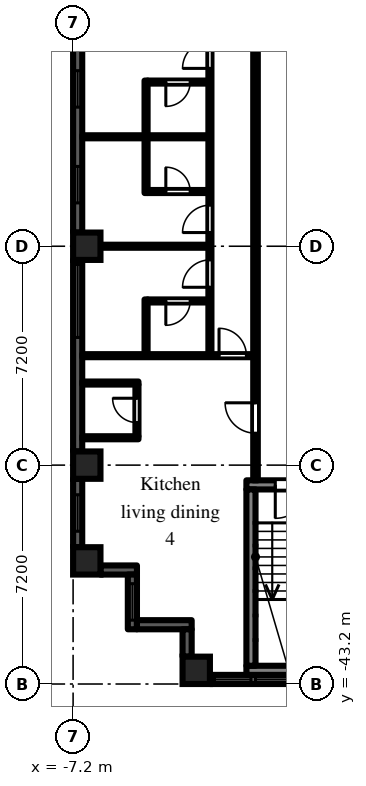
"""IFC4 building model, lengths in metres.
Left out: names, types, materials, properties, quantities, classifications, styles, units other than length and angle.
Written with IfcOpenShell. Run it as: python <this file> out.ifc"""

import sys

from ifc_helpers import new_model, si_unit, direction, frame, frame_2d, origin, origin_2d, place, context, subcontext, project, spatial, rectangle, extrude, element, fill, save


model = new_model("IFC4")
c1 = context("Model", 3, precision=1e-05, world=origin(), true_north=direction((0.0, 1.0)))
c2 = subcontext(c1, "Body", "Model", "MODEL_VIEW")
j1 = project(units=[si_unit("LENGTHUNIT", "METRE"), si_unit("PLANEANGLEUNIT", "RADIAN")], contexts=[c1])
p1 = place(None, origin())
s1 = spatial("IfcSite", under=j1, at=p1, CompositionType="ELEMENT")
p2 = place(p1, origin())
s2 = spatial("IfcBuilding", under=s1, at=p2, CompositionType="ELEMENT")
p3 = place(p2, frame((0.0, 0.0, 11.7)))
s3 = spatial("IfcBuildingStorey", under=s2, at=p3, CompositionType="ELEMENT", Elevation=11.7)
for number, where, z_axis, x_axis in (
    (1, (-6.75, -39.15, 0.0), (0.0, 0.0, 1.0), (1.0, 0.0, 0.0)),
    (2, (-6.75, -36.0, 0.0), (0.0, 0.0, 1.0), (1.0, 0.0, 0.0)),
    (3, (-6.75, -28.8, 0.0), (0.0, 0.0, 1.0), (1.0, 0.0, 0.0)),
    (4, (-3.15, -42.75, 0.0), (0.0, 0.0, 1.0), (1.0, 0.0, 0.0)),
):
    element("IfcColumn", number, at=place(p3, frame(where, z_axis=z_axis, x_axis=x_axis)), inside=s3, PredefinedType="COLUMN", context=c2, shape_type="SweptSolid", body=[
        extrude(rectangle(XDim=0.9, YDim=0.9, at=origin_2d()), origin(), (0.0, 0.0, 1.0), 3.0),
    ])
p4 = place(p3, frame((-7.05, -22.05, 0.0), z_axis=(0.0, 0.0, 1.0), x_axis=(0.0, -1.0, 0.0)))
e5 = element("IfcWall", 5, at=p4, inside=s3, PredefinedType="SOLIDWALL", context=c2, shape_type="SweptSolid", body=[
    extrude(rectangle(XDim=6.3, YDim=0.3, at=frame_2d((3.15, 0.0))), origin(), (0.0, 0.0, 1.0), 2.1),
])
p5 = place(p4, frame((0.975, 0.0, 0.2)))
e6 = element("IfcOpeningElement", 6, at=p5, cuts=e5, PredefinedType="OPENING", context=c2, shape_type="SweptSolid", body=[
    extrude(rectangle(XDim=1.2, YDim=1.85, at=frame_2d((0.6, 0.925))), frame((0.0, 0.16, 0.0), z_axis=(0.0, -1.0, 0.0), x_axis=(1.0, 0.0, 0.0)), (0.0, 0.0, 1.0), 0.32),
])
p6 = place(p4, frame((4.125, 0.0, 0.2)))
e7 = element("IfcOpeningElement", 7, at=p6, cuts=e5, PredefinedType="OPENING", context=c2, shape_type="SweptSolid", body=[
    extrude(rectangle(XDim=1.2, YDim=1.85, at=frame_2d((0.6, 0.925))), frame((0.0, 0.16, 0.0), z_axis=(0.0, -1.0, 0.0), x_axis=(1.0, 0.0, 0.0)), (0.0, 0.0, 1.0), 0.32),
])
p7 = place(p3, frame((-7.05, -29.25, 0.0), z_axis=(0.0, 0.0, 1.0), x_axis=(0.0, -1.0, 0.0)))
e8 = element("IfcWall", 8, at=p7, inside=s3, PredefinedType="SOLIDWALL", context=c2, shape_type="SweptSolid", body=[
    extrude(rectangle(XDim=6.3, YDim=0.3, at=frame_2d((3.15, 0.0))), origin(), (0.0, 0.0, 1.0), 2.1),
])
p8 = place(p7, frame((0.15, 0.0, 0.2)))
e9 = element("IfcOpeningElement", 9, at=p8, cuts=e8, PredefinedType="OPENING", context=c2, shape_type="SweptSolid", body=[
    extrude(rectangle(XDim=2.4, YDim=1.85, at=frame_2d((1.2, 0.925))), frame((0.0, 0.16, 0.0), z_axis=(0.0, -1.0, 0.0), x_axis=(1.0, 0.0, 0.0)), (0.0, 0.0, 1.0), 0.32),
])
p9 = place(p3, frame((-7.05, -36.45, 0.0), z_axis=(0.0, 0.0, 1.0), x_axis=(0.0, -1.0, 0.0)))
e10 = element("IfcWall", 10, at=p9, inside=s3, PredefinedType="SOLIDWALL", context=c2, shape_type="SweptSolid", body=[
    extrude(rectangle(XDim=2.25, YDim=0.3, at=frame_2d((1.125, 0.0))), origin(), (0.0, 0.0, 1.0), 2.1),
])
p10 = place(p9, frame((0.525, 0.0, 0.2)))
e11 = element("IfcOpeningElement", 11, at=p10, cuts=e10, PredefinedType="OPENING", context=c2, shape_type="SweptSolid", body=[
    extrude(rectangle(XDim=1.2, YDim=1.85, at=frame_2d((0.6, 0.925))), frame((0.0, 0.16, 0.0), z_axis=(0.0, -1.0, 0.0), x_axis=(1.0, 0.0, 0.0)), (0.0, 0.0, 1.0), 0.32),
])
p11 = place(p3, frame((-6.3, -39.45, 0.0), z_axis=(0.0, 0.0, 1.0), x_axis=(1.0, 0.0, 0.0)))
e12 = element("IfcWall", 12, at=p11, inside=s3, PredefinedType="SOLIDWALL", context=c2, shape_type="SweptSolid", body=[
    extrude(rectangle(XDim=1.2, YDim=0.3, at=frame_2d((0.6, 0.0))), origin(), (0.0, 0.0, 1.0), 2.575),
])
p12 = place(p3, frame((-5.25, -39.6, 0.0), z_axis=(0.0, 0.0, 1.0), x_axis=(0.0, -1.0, 0.0)))
e13 = element("IfcWall", 13, at=p12, inside=s3, PredefinedType="SOLIDWALL", context=c2, shape_type="SweptSolid", body=[
    extrude(rectangle(XDim=1.8, YDim=0.3, at=frame_2d((0.9, 0.0))), origin(), (0.0, 0.0, 1.0), 2.575),
])
p13 = place(p12, frame((0.3, 0.0, 0.2)))
e14 = element("IfcOpeningElement", 14, at=p13, cuts=e13, PredefinedType="OPENING", context=c2, shape_type="SweptSolid", body=[
    extrude(rectangle(XDim=1.2, YDim=1.85, at=frame_2d((0.6, 0.925))), frame((0.0, 0.16, 0.0), z_axis=(0.0, -1.0, 0.0), x_axis=(1.0, 0.0, 0.0)), (0.0, 0.0, 1.0), 0.32),
])
p14 = place(p3, frame((-5.1, -41.25, 0.0), z_axis=(0.0, 0.0, 1.0), x_axis=(1.0, 0.0, 0.0)))
e15 = element("IfcWall", 15, at=p14, inside=s3, PredefinedType="SOLIDWALL", context=c2, shape_type="SweptSolid", body=[
    extrude(rectangle(XDim=1.8, YDim=0.3, at=frame_2d((0.9, 0.0))), origin(), (0.0, 0.0, 1.0), 2.575),
])
p15 = place(p3, frame((-3.45, -41.4, 0.0), z_axis=(0.0, 0.0, 1.0), x_axis=(0.0, -1.0, 0.0)))
e16 = element("IfcWall", 16, at=p15, inside=s3, PredefinedType="SOLIDWALL", context=c2, shape_type="SweptSolid", body=[
    extrude(rectangle(XDim=0.9, YDim=0.3, at=frame_2d((0.45, 0.0))), origin(), (0.0, 0.0, 1.0), 2.575),
])
p16 = place(p3, frame((-2.7, -43.05, 0.0), z_axis=(0.0, 0.0, 1.0), x_axis=(1.0, 0.0, 0.0)))
e17 = element("IfcWall", 17, at=p16, inside=s3, PredefinedType="SOLIDWALL", context=c2, shape_type="SweptSolid", body=[
    extrude(rectangle(XDim=5.4, YDim=0.3, at=frame_2d((2.7, 0.0))), origin(), (0.0, 0.0, 1.0), 2.1),
])
p17 = place(p16, frame((1.5, 0.0, 0.2)))
e18 = element("IfcOpeningElement", 18, at=p17, cuts=e17, PredefinedType="OPENING", context=c2, shape_type="SweptSolid", body=[
    extrude(rectangle(XDim=2.4, YDim=1.85, at=frame_2d((1.2, 0.925))), frame((0.0, 0.16, 0.0), z_axis=(0.0, -1.0, 0.0), x_axis=(1.0, 0.0, 0.0)), (0.0, 0.0, 1.0), 0.32),
])
p18 = place(p16, frame((0.15, 0.0, 0.2)))
e19 = element("IfcOpeningElement", 19, at=p18, cuts=e17, PredefinedType="OPENING", context=c2, shape_type="SweptSolid", body=[
    extrude(rectangle(XDim=1.2, YDim=1.85, at=frame_2d((0.6, 0.925))), frame((0.0, 0.16, 0.0), z_axis=(0.0, -1.0, 0.0), x_axis=(1.0, 0.0, 0.0)), (0.0, 0.0, 1.0), 0.32),
])
p19 = place(p16, frame((4.05, 0.0, 0.2)))
e20 = element("IfcOpeningElement", 20, at=p19, cuts=e17, PredefinedType="OPENING", context=c2, shape_type="SweptSolid", body=[
    extrude(rectangle(XDim=1.2, YDim=1.85, at=frame_2d((0.6, 0.925))), frame((0.0, 0.16, 0.0), z_axis=(0.0, -1.0, 0.0), x_axis=(1.0, 0.0, 0.0)), (0.0, 0.0, 1.0), 0.32),
])
p20 = place(p3, frame((-1.5, -36.65, 0.0), z_axis=(0.0, 0.0, 1.0), x_axis=(1.0, 0.0, 0.0)))
e21 = element("IfcWall", 21, at=p20, inside=s3, PredefinedType="SHEAR", context=c2, shape_type="SweptSolid", body=[
    extrude(rectangle(XDim=3.0, YDim=0.3, at=frame_2d((1.5, 0.0))), origin(), (0.0, 0.0, 1.0), 2.575),
])
p21 = place(p20, frame((0.95, 0.0, 0.0)))
e22 = element("IfcOpeningElement", 22, at=p21, cuts=e21, PredefinedType="OPENING", context=c2, shape_type="SweptSolid", body=[
    extrude(rectangle(XDim=1.1, YDim=2.1, at=frame_2d((0.55, 1.05))), frame((0.0, 0.16, 0.0), z_axis=(0.0, -1.0, 0.0), x_axis=(1.0, 0.0, 0.0)), (0.0, 0.0, 1.0), 0.32),
])
p22 = place(p3, frame((-1.5, -42.75, 0.0), z_axis=(0.0, 0.0, 1.0), x_axis=(1.0, 0.0, 0.0)))
e23 = element("IfcWall", 23, at=p22, inside=s3, PredefinedType="SHEAR", context=c2, shape_type="SweptSolid", body=[
    extrude(rectangle(XDim=3.0, YDim=0.3, at=frame_2d((1.5, 0.0))), origin(), (0.0, 0.0, 1.0), 2.575),
])
p23 = place(p3, frame((-1.35, -36.8, 0.0), z_axis=(0.0, 0.0, 1.0), x_axis=(0.0, -1.0, 0.0)))
e24 = element("IfcWall", 24, at=p23, inside=s3, PredefinedType="SHEAR", context=c2, shape_type="SweptSolid", body=[
    extrude(rectangle(XDim=5.8, YDim=0.3, at=frame_2d((2.9, 0.0))), origin(), (0.0, 0.0, 1.0), 2.575),
])
for number, where, z_axis, x_axis in (
    (25, (-6.9, -35.1, 0.0), (0.0, 0.0, 1.0), (1.0, 0.0, 0.0)),
    (26, (-6.9, -33.3, 0.0), (0.0, 0.0, 1.0), (1.0, 0.0, 0.0)),
):
    element("IfcWall", number, at=place(p3, frame(where, z_axis=z_axis, x_axis=x_axis)), inside=s3, PredefinedType="PARTITIONING", context=c2, shape_type="SweptSolid", body=[
        extrude(rectangle(XDim=1.85, YDim=0.1, at=frame_2d((0.925, 0.0))), origin(), (0.0, 0.0, 1.0), 2.575),
    ])
p24 = place(p3, frame((-6.9, -32.4, 0.0), z_axis=(0.0, 0.0, 1.0), x_axis=(1.0, 0.0, 0.0)))
e27 = element("IfcWall", 27, at=p24, inside=s3, PredefinedType="PARTITIONING", context=c2, shape_type="SweptSolid", body=[
    extrude(rectangle(XDim=5.625, YDim=0.1, at=frame_2d((2.812, 0.0))), origin(), (0.0, 0.0, 1.0), 2.575),
])
p25 = place(p24, frame((4.5, 0.0, 0.0)))
e28 = element("IfcOpeningElement", 28, at=p25, cuts=e27, PredefinedType="OPENING", context=c2, shape_type="SweptSolid", body=[
    extrude(rectangle(XDim=0.9, YDim=2.1, at=frame_2d((0.45, 1.05))), frame((0.0, 0.06, 0.0), z_axis=(0.0, -1.0, 0.0), x_axis=(1.0, 0.0, 0.0)), (0.0, 0.0, 1.0), 0.12),
])
for number, where, z_axis, x_axis in (
    (29, (-6.9, -28.8, 0.0), (0.0, 0.0, 1.0), (1.0, 0.0, 0.0)),
    (30, (-6.9, -25.2, 0.0), (0.0, 0.0, 1.0), (1.0, 0.0, 0.0)),
):
    element("IfcWall", number, at=place(p3, frame(where, z_axis=z_axis, x_axis=x_axis)), inside=s3, PredefinedType="PARTITIONING", context=c2, shape_type="SweptSolid", body=[
        extrude(rectangle(XDim=4.15, YDim=0.1, at=frame_2d((2.075, 0.0))), origin(), (0.0, 0.0, 1.0), 2.575),
    ])
p26 = place(p3, frame((-5.1, -35.05, 0.0), z_axis=(0.0, 0.0, 1.0), x_axis=(0.0, 1.0, 0.0)))
e31 = element("IfcWall", 31, at=p26, inside=s3, PredefinedType="PARTITIONING", context=c2, shape_type="SweptSolid", body=[
    extrude(rectangle(XDim=1.7, YDim=0.1, at=frame_2d((0.85, 0.0))), origin(), (0.0, 0.0, 1.0), 2.575),
])
p27 = place(p26, frame((0.45, 0.0, 0.0)))
e32 = element("IfcOpeningElement", 32, at=p27, cuts=e31, PredefinedType="OPENING", context=c2, shape_type="SweptSolid", body=[
    extrude(rectangle(XDim=0.8, YDim=2.1, at=frame_2d((0.4, 1.05))), frame((0.0, 0.06, 0.0), z_axis=(0.0, -1.0, 0.0), x_axis=(1.0, 0.0, 0.0)), (0.0, 0.0, 1.0), 0.12),
])
p28 = place(p3, frame((-4.8, -32.35, 0.0), z_axis=(0.0, 0.0, 1.0), x_axis=(0.0, 1.0, 0.0)))
e33 = element("IfcWall", 33, at=p28, inside=s3, PredefinedType="PARTITIONING", context=c2, shape_type="SweptSolid", body=[
    extrude(rectangle(XDim=1.8, YDim=0.1, at=frame_2d((0.9, 0.0))), origin(), (0.0, 0.0, 1.0), 2.575),
])
p29 = place(p3, frame((-4.75, -30.6, 0.0), z_axis=(0.0, 0.0, 1.0), x_axis=(1.0, 0.0, 0.0)))
e34 = element("IfcWall", 34, at=p29, inside=s3, PredefinedType="PARTITIONING", context=c2, shape_type="SweptSolid", body=[
    extrude(rectangle(XDim=2.0, YDim=0.1, at=frame_2d((1.0, 0.0))), origin(), (0.0, 0.0, 1.0), 2.575),
])
p30 = place(p29, frame((0.6, 0.0, 0.0)))
e35 = element("IfcOpeningElement", 35, at=p30, cuts=e34, PredefinedType="OPENING", context=c2, shape_type="SweptSolid", body=[
    extrude(rectangle(XDim=0.8, YDim=2.1, at=frame_2d((0.4, 1.05))), frame((0.0, 0.06, 0.0), z_axis=(0.0, -1.0, 0.0), x_axis=(1.0, 0.0, 0.0)), (0.0, 0.0, 1.0), 0.12),
])
p31 = place(p3, frame((-4.8, -27.05, 0.0), z_axis=(0.0, 0.0, 1.0), x_axis=(0.0, 1.0, 0.0)))
e36 = element("IfcWall", 36, at=p31, inside=s3, PredefinedType="PARTITIONING", context=c2, shape_type="SweptSolid", body=[
    extrude(rectangle(XDim=3.7, YDim=0.1, at=frame_2d((1.85, 0.0))), origin(), (0.0, 0.0, 1.0), 2.575),
])
p32 = place(p3, frame((-4.75, -27.0, 0.0), z_axis=(0.0, 0.0, 1.0), x_axis=(1.0, 0.0, 0.0)))
e37 = element("IfcWall", 37, at=p32, inside=s3, PredefinedType="PARTITIONING", context=c2, shape_type="SweptSolid", body=[
    extrude(rectangle(XDim=2.0, YDim=0.1, at=frame_2d((1.0, 0.0))), origin(), (0.0, 0.0, 1.0), 2.575),
])
p33 = place(p32, frame((0.6, 0.0, 0.0)))
e38 = element("IfcOpeningElement", 38, at=p33, cuts=e37, PredefinedType="OPENING", context=c2, shape_type="SweptSolid", body=[
    extrude(rectangle(XDim=0.8, YDim=2.1, at=frame_2d((0.4, 1.05))), frame((0.0, 0.06, 0.0), z_axis=(0.0, -1.0, 0.0), x_axis=(1.0, 0.0, 0.0)), (0.0, 0.0, 1.0), 0.12),
])
p34 = place(p3, frame((-4.75, -23.4, 0.0), z_axis=(0.0, 0.0, 1.0), x_axis=(1.0, 0.0, 0.0)))
e39 = element("IfcWall", 39, at=p34, inside=s3, PredefinedType="PARTITIONING", context=c2, shape_type="SweptSolid", body=[
    extrude(rectangle(XDim=2.0, YDim=0.1, at=frame_2d((1.0, 0.0))), origin(), (0.0, 0.0, 1.0), 2.575),
])
p35 = place(p34, frame((0.6, 0.0, 0.0)))
e40 = element("IfcOpeningElement", 40, at=p35, cuts=e39, PredefinedType="OPENING", context=c2, shape_type="SweptSolid", body=[
    extrude(rectangle(XDim=0.8, YDim=2.1, at=frame_2d((0.4, 1.05))), frame((0.0, 0.06, 0.0), z_axis=(0.0, -1.0, 0.0), x_axis=(1.0, 0.0, 0.0)), (0.0, 0.0, 1.0), 0.12),
])
p36 = place(p3, frame((-2.7, -32.35, 0.0), z_axis=(0.0, 0.0, 1.0), x_axis=(0.0, 1.0, 0.0)))
e41 = element("IfcWall", 41, at=p36, inside=s3, PredefinedType="PARTITIONING", context=c2, shape_type="SweptSolid", body=[
    extrude(rectangle(XDim=17.888, YDim=0.1, at=frame_2d((8.944, 0.0))), origin(), (0.0, 0.0, 1.0), 2.575),
])
p37 = place(p36, frame((2.2, 0.0, 0.0)))
e42 = element("IfcOpeningElement", 42, at=p37, cuts=e41, PredefinedType="OPENING", context=c2, shape_type="SweptSolid", body=[
    extrude(rectangle(XDim=0.9, YDim=2.1, at=frame_2d((0.45, 1.05))), frame((0.0, 0.06, 0.0), z_axis=(0.0, -1.0, 0.0), x_axis=(1.0, 0.0, 0.0)), (0.0, 0.0, 1.0), 0.12),
])
p38 = place(p36, frame((4.0, 0.0, 0.0)))
e43 = element("IfcOpeningElement", 43, at=p38, cuts=e41, PredefinedType="OPENING", context=c2, shape_type="SweptSolid", body=[
    extrude(rectangle(XDim=0.9, YDim=2.1, at=frame_2d((0.45, 1.05))), frame((0.0, 0.06, 0.0), z_axis=(0.0, -1.0, 0.0), x_axis=(1.0, 0.0, 0.0)), (0.0, 0.0, 1.0), 0.12),
])
p39 = place(p36, frame((9.4, 0.0, 0.0)))
e44 = element("IfcOpeningElement", 44, at=p39, cuts=e41, PredefinedType="OPENING", context=c2, shape_type="SweptSolid", body=[
    extrude(rectangle(XDim=0.9, YDim=2.1, at=frame_2d((0.45, 1.05))), frame((0.0, 0.06, 0.0), z_axis=(0.0, -1.0, 0.0), x_axis=(1.0, 0.0, 0.0)), (0.0, 0.0, 1.0), 0.12),
])
p40 = place(p36, frame((11.2, 0.0, 0.0)))
e45 = element("IfcOpeningElement", 45, at=p40, cuts=e41, PredefinedType="OPENING", context=c2, shape_type="SweptSolid", body=[
    extrude(rectangle(XDim=0.9, YDim=2.1, at=frame_2d((0.45, 1.05))), frame((0.0, 0.06, 0.0), z_axis=(0.0, -1.0, 0.0), x_axis=(1.0, 0.0, 0.0)), (0.0, 0.0, 1.0), 0.12),
])
p41 = place(p36, frame((14.8, 0.0, 0.0)))
e46 = element("IfcOpeningElement", 46, at=p41, cuts=e41, PredefinedType="OPENING", context=c2, shape_type="SweptSolid", body=[
    extrude(rectangle(XDim=0.9, YDim=2.1, at=frame_2d((0.45, 1.05))), frame((0.0, 0.06, 0.0), z_axis=(0.0, -1.0, 0.0), x_axis=(1.0, 0.0, 0.0)), (0.0, 0.0, 1.0), 0.12),
])
p42 = place(p3, frame((-1.2, -36.5, 0.0), z_axis=(0.0, 0.0, 1.0), x_axis=(0.0, 1.0, 0.0)))
e47 = element("IfcWall", 47, at=p42, inside=s3, PredefinedType="PARTITIONING", context=c2, shape_type="SweptSolid", body=[
    extrude(rectangle(XDim=35.375, YDim=0.15, at=frame_2d((17.688, 0.0))), origin(), (0.0, 0.0, 1.0), 2.575),
])
p43 = place(p42, frame((31.85, 0.0, 0.0)))
e48 = element("IfcOpeningElement", 48, at=p43, cuts=e47, PredefinedType="OPENING", context=c2, shape_type="SweptSolid", body=[
    extrude(rectangle(XDim=0.9, YDim=2.1, at=frame_2d((0.45, 1.05))), frame((0.0, 0.085, 0.0), z_axis=(0.0, -1.0, 0.0), x_axis=(1.0, 0.0, 0.0)), (0.0, 0.0, 1.0), 0.17),
])
p44 = place(p42, frame((27.05, 0.0, 0.0)))
e49 = element("IfcOpeningElement", 49, at=p44, cuts=e47, PredefinedType="OPENING", context=c2, shape_type="SweptSolid", body=[
    extrude(rectangle(XDim=0.9, YDim=2.1, at=frame_2d((0.45, 1.05))), frame((0.0, 0.085, 0.0), z_axis=(0.0, -1.0, 0.0), x_axis=(1.0, 0.0, 0.0)), (0.0, 0.0, 1.0), 0.17),
])
p45 = place(p42, frame((1.55, 0.0, 0.0)))
e50 = element("IfcOpeningElement", 50, at=p45, cuts=e47, PredefinedType="OPENING", context=c2, shape_type="SweptSolid", body=[
    extrude(rectangle(XDim=1.0, YDim=2.1, at=frame_2d((0.5, 1.05))), frame((0.0, 0.085, 0.0), z_axis=(0.0, -1.0, 0.0), x_axis=(1.0, 0.0, 0.0)), (0.0, 0.0, 1.0), 0.17),
])
p46 = place(p5, origin())
e51 = element("IfcWindow", 51, at=p46, inside=s3, PartitioningType="SINGLE_PANEL", PredefinedType="WINDOW", context=c2, shape_type="SweptSolid", body=[
    extrude(rectangle(XDim=1.2, YDim=1.85, at=frame_2d((0.6, 0.925))), frame((0.0, 0.03, 0.0), z_axis=(0.0, -1.0, 0.0), x_axis=(1.0, 0.0, 0.0)), (0.0, 0.0, 1.0), 0.06),
])
fill(e6, e51)
p47 = place(p6, origin())
e52 = element("IfcWindow", 52, at=p47, inside=s3, PartitioningType="SINGLE_PANEL", PredefinedType="WINDOW", context=c2, shape_type="SweptSolid", body=[
    extrude(rectangle(XDim=1.2, YDim=1.85, at=frame_2d((0.6, 0.925))), frame((0.0, 0.03, 0.0), z_axis=(0.0, -1.0, 0.0), x_axis=(1.0, 0.0, 0.0)), (0.0, 0.0, 1.0), 0.06),
])
fill(e7, e52)
p48 = place(p8, origin())
e53 = element("IfcWindow", 53, at=p48, inside=s3, PartitioningType="SINGLE_PANEL", PredefinedType="WINDOW", context=c2, shape_type="SweptSolid", body=[
    extrude(rectangle(XDim=2.4, YDim=1.85, at=frame_2d((1.2, 0.925))), frame((0.0, 0.03, 0.0), z_axis=(0.0, -1.0, 0.0), x_axis=(1.0, 0.0, 0.0)), (0.0, 0.0, 1.0), 0.06),
])
fill(e9, e53)
p49 = place(p10, origin())
e54 = element("IfcWindow", 54, at=p49, inside=s3, PartitioningType="SINGLE_PANEL", PredefinedType="WINDOW", context=c2, shape_type="SweptSolid", body=[
    extrude(rectangle(XDim=1.2, YDim=1.85, at=frame_2d((0.6, 0.925))), frame((0.0, 0.03, 0.0), z_axis=(0.0, -1.0, 0.0), x_axis=(1.0, 0.0, 0.0)), (0.0, 0.0, 1.0), 0.06),
])
fill(e11, e54)
p50 = place(p13, origin())
e55 = element("IfcWindow", 55, at=p50, inside=s3, PartitioningType="SINGLE_PANEL", PredefinedType="WINDOW", context=c2, shape_type="SweptSolid", body=[
    extrude(rectangle(XDim=1.2, YDim=1.85, at=frame_2d((0.6, 0.925))), frame((0.0, 0.03, 0.0), z_axis=(0.0, -1.0, 0.0), x_axis=(1.0, 0.0, 0.0)), (0.0, 0.0, 1.0), 0.06),
])
fill(e14, e55)
p51 = place(p17, origin())
e56 = element("IfcWindow", 56, at=p51, inside=s3, PartitioningType="SINGLE_PANEL", PredefinedType="WINDOW", context=c2, shape_type="SweptSolid", body=[
    extrude(rectangle(XDim=2.4, YDim=1.85, at=frame_2d((1.2, 0.925))), frame((0.0, 0.03, 0.0), z_axis=(0.0, -1.0, 0.0), x_axis=(1.0, 0.0, 0.0)), (0.0, 0.0, 1.0), 0.06),
])
fill(e18, e56)
p52 = place(p18, origin())
e57 = element("IfcWindow", 57, at=p52, inside=s3, PartitioningType="SINGLE_PANEL", PredefinedType="WINDOW", context=c2, shape_type="SweptSolid", body=[
    extrude(rectangle(XDim=1.2, YDim=1.85, at=frame_2d((0.6, 0.925))), frame((0.0, 0.03, 0.0), z_axis=(0.0, -1.0, 0.0), x_axis=(1.0, 0.0, 0.0)), (0.0, 0.0, 1.0), 0.06),
])
fill(e19, e57)
p53 = place(p21, frame((1.1, 0.0, 0.0), z_axis=(0.0, 0.0, 1.0), x_axis=(-1.0, 0.0, 0.0)))
e58 = element("IfcDoor", 58, at=p53, inside=s3, OperationType="SINGLE_SWING_RIGHT", PredefinedType="DOOR", context=c2, shape_type="SweptSolid", body=[
    extrude(rectangle(XDim=1.1, YDim=2.1, at=frame_2d((0.55, 1.05))), frame((0.0, 0.025, 0.0), z_axis=(0.0, -1.0, 0.0), x_axis=(1.0, 0.0, 0.0)), (0.0, 0.0, 1.0), 0.05),
])
fill(e22, e58)
p54 = place(p27, origin())
e59 = element("IfcDoor", 59, at=p54, inside=s3, OperationType="SINGLE_SWING_RIGHT", PredefinedType="DOOR", context=c2, shape_type="SweptSolid", body=[
    extrude(rectangle(XDim=0.8, YDim=2.1, at=frame_2d((0.4, 1.05))), frame((0.0, 0.025, 0.0), z_axis=(0.0, -1.0, 0.0), x_axis=(1.0, 0.0, 0.0)), (0.0, 0.0, 1.0), 0.05),
])
fill(e32, e59)
p55 = place(p45, origin())
e60 = element("IfcDoor", 60, at=p55, inside=s3, OperationType="SINGLE_SWING_RIGHT", PredefinedType="DOOR", context=c2, shape_type="SweptSolid", body=[
    extrude(rectangle(XDim=1.0, YDim=2.1, at=frame_2d((0.5, 1.05))), frame((0.0, 0.025, 0.0), z_axis=(0.0, -1.0, 0.0), x_axis=(1.0, 0.0, 0.0)), (0.0, 0.0, 1.0), 0.05),
])
fill(e50, e60)
p56 = place(p37, origin())
e61 = element("IfcDoor", 61, at=p56, inside=s3, OperationType="SINGLE_SWING_LEFT", PredefinedType="DOOR", context=c2, shape_type="SweptSolid", body=[
    extrude(rectangle(XDim=0.9, YDim=2.1, at=frame_2d((0.45, 1.05))), frame((0.0, 0.025, 0.0), z_axis=(0.0, -1.0, 0.0), x_axis=(1.0, 0.0, 0.0)), (0.0, 0.0, 1.0), 0.05),
])
fill(e42, e61)
p57 = place(p38, origin())
e62 = element("IfcDoor", 62, at=p57, inside=s3, OperationType="SINGLE_SWING_LEFT", PredefinedType="DOOR", context=c2, shape_type="SweptSolid", body=[
    extrude(rectangle(XDim=0.9, YDim=2.1, at=frame_2d((0.45, 1.05))), frame((0.0, 0.025, 0.0), z_axis=(0.0, -1.0, 0.0), x_axis=(1.0, 0.0, 0.0)), (0.0, 0.0, 1.0), 0.05),
])
fill(e43, e62)
p58 = place(p39, origin())
e63 = element("IfcDoor", 63, at=p58, inside=s3, OperationType="SINGLE_SWING_LEFT", PredefinedType="DOOR", context=c2, shape_type="SweptSolid", body=[
    extrude(rectangle(XDim=0.9, YDim=2.1, at=frame_2d((0.45, 1.05))), frame((0.0, 0.025, 0.0), z_axis=(0.0, -1.0, 0.0), x_axis=(1.0, 0.0, 0.0)), (0.0, 0.0, 1.0), 0.05),
])
fill(e44, e63)
p59 = place(p25, origin())
e64 = element("IfcDoor", 64, at=p59, inside=s3, OperationType="SINGLE_SWING_LEFT", PredefinedType="DOOR", context=c2, shape_type="SweptSolid", body=[
    extrude(rectangle(XDim=0.9, YDim=2.1, at=frame_2d((0.45, 1.05))), frame((0.0, 0.025, 0.0), z_axis=(0.0, -1.0, 0.0), x_axis=(1.0, 0.0, 0.0)), (0.0, 0.0, 1.0), 0.05),
])
fill(e28, e64)
p60 = place(p35, frame((0.8, 0.0, 0.0), z_axis=(0.0, 0.0, 1.0), x_axis=(-1.0, 0.0, 0.0)))
e65 = element("IfcDoor", 65, at=p60, inside=s3, OperationType="SINGLE_SWING_RIGHT", PredefinedType="DOOR", context=c2, shape_type="SweptSolid", body=[
    extrude(rectangle(XDim=0.8, YDim=2.1, at=frame_2d((0.4, 1.05))), frame((0.0, 0.025, 0.0), z_axis=(0.0, -1.0, 0.0), x_axis=(1.0, 0.0, 0.0)), (0.0, 0.0, 1.0), 0.05),
])
fill(e40, e65)
p61 = place(p33, origin())
e66 = element("IfcDoor", 66, at=p61, inside=s3, OperationType="SINGLE_SWING_LEFT", PredefinedType="DOOR", context=c2, shape_type="SweptSolid", body=[
    extrude(rectangle(XDim=0.8, YDim=2.1, at=frame_2d((0.4, 1.05))), frame((0.0, 0.025, 0.0), z_axis=(0.0, -1.0, 0.0), x_axis=(1.0, 0.0, 0.0)), (0.0, 0.0, 1.0), 0.05),
])
fill(e38, e66)
p62 = place(p30, frame((0.8, 0.0, 0.0), z_axis=(0.0, 0.0, 1.0), x_axis=(-1.0, 0.0, 0.0)))
e67 = element("IfcDoor", 67, at=p62, inside=s3, OperationType="SINGLE_SWING_RIGHT", PredefinedType="DOOR", context=c2, shape_type="SweptSolid", body=[
    extrude(rectangle(XDim=0.8, YDim=2.1, at=frame_2d((0.4, 1.05))), frame((0.0, 0.025, 0.0), z_axis=(0.0, -1.0, 0.0), x_axis=(1.0, 0.0, 0.0)), (0.0, 0.0, 1.0), 0.05),
])
fill(e35, e67)
save(model, sys.argv[1])
